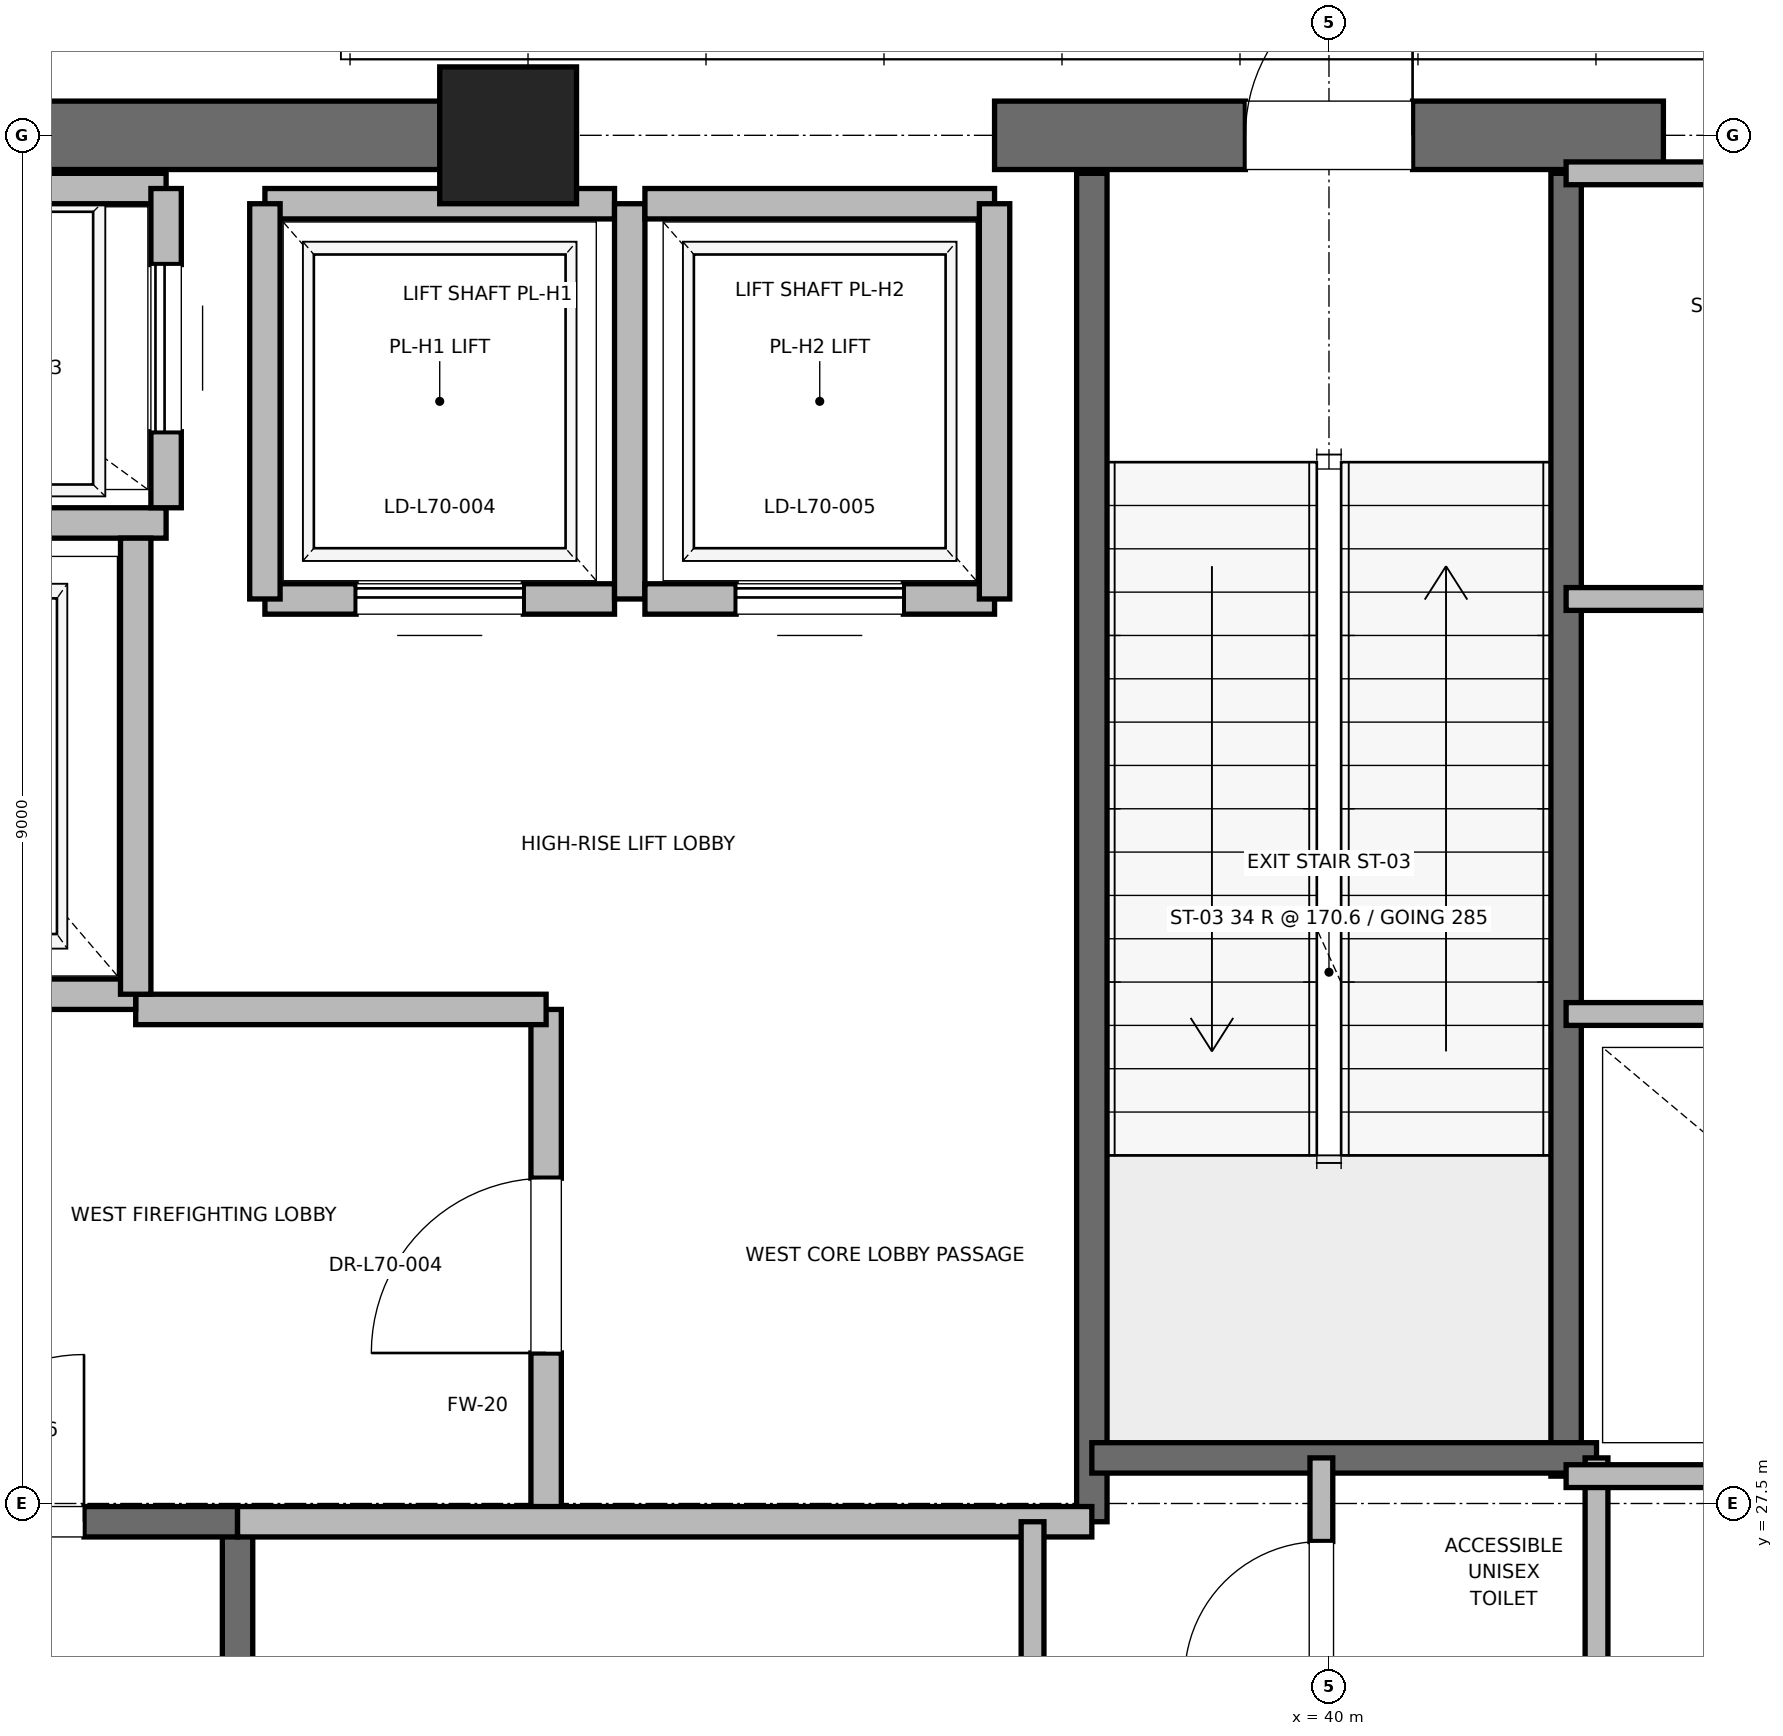
"""IFC4 building model, lengths in metres.
Left out: names, types, materials, properties, quantities, classifications, styles, units other than length and angle.
Written with IfcOpenShell. Run it as: python <this file> out.ifc"""

import sys

from ifc_helpers import new_model, si_unit, direction, frame, frame_2d, origin, origin_2d, place, context, subcontext, project, spatial, rectangle, extrude, element, fill, save


model = new_model("IFC4")
c1 = context("Model", 3, precision=1e-05, world=origin(), true_north=direction((0.0, 1.0)))
c2 = subcontext(c1, "Body", "Model", "MODEL_VIEW")
j1 = project(units=[si_unit("LENGTHUNIT", "METRE"), si_unit("PLANEANGLEUNIT", "RADIAN")], contexts=[c1])
p1 = place(None, origin())
s1 = spatial("IfcSite", under=j1, at=p1, CompositionType="ELEMENT")
p2 = place(p1, origin())
s2 = spatial("IfcBuilding", under=s1, at=p2, CompositionType="ELEMENT")
p3 = place(p2, frame((0.0, 0.0, 301.0)))
s3 = spatial("IfcBuildingStorey", under=s2, at=p3, CompositionType="ELEMENT", Elevation=301.0)
p4 = place(p3, frame((34.6, 36.5, 0.0), z_axis=(0.0, 0.0, 1.0), x_axis=(1.0, 0.0, 0.0)))
e1 = element("IfcColumn", 1, at=p4, inside=s3, PredefinedType="PILASTER", context=c2, shape_type="SweptSolid", body=[
    extrude(rectangle(XDim=0.9, YDim=0.9, at=origin_2d()), origin(), (0.0, 0.0, 1.0), 5.8),
])
p5 = place(p3, frame((29.0, 36.5, 0.0), z_axis=(0.0, 0.0, 1.0), x_axis=(1.0, 0.0, 0.0)))
e2 = element("IfcWall", 2, at=p5, inside=s3, PredefinedType="SHEAR", context=c2, shape_type="SweptSolid", body=[
    extrude(rectangle(XDim=5.8, YDim=0.45, at=frame_2d((2.9, 0.0))), origin(), (0.0, 0.0, 1.0), 5.585),
])
p6 = place(p3, frame((37.8, 36.5, 0.0), z_axis=(0.0, 0.0, 1.0), x_axis=(1.0, 0.0, 0.0)))
e3 = element("IfcWall", 3, at=p6, inside=s3, PredefinedType="SHEAR", context=c2, shape_type="SweptSolid", body=[
    extrude(rectangle(XDim=4.4, YDim=0.45, at=frame_2d((2.2, 0.0))), origin(), (0.0, 0.0, 1.0), 5.585),
])
p7 = place(p6, frame((1.65, 0.0, 0.0)))
e4 = element("IfcOpeningElement", 4, at=p7, cuts=e3, PredefinedType="OPENING", context=c2, shape_type="SweptSolid", body=[
    extrude(rectangle(XDim=1.1, YDim=2.15, at=frame_2d((0.55, 1.075))), frame((0.0, 0.225, 0.0), z_axis=(0.0, -1.0, 0.0), x_axis=(1.0, 0.0, 0.0)), (0.0, 0.0, 1.0), 0.45),
])
p8 = place(p3, frame((32.82, 18.6, 0.0), z_axis=(0.0, 0.0, 1.0), x_axis=(0.0, 1.0, 0.0)))
e5 = element("IfcWall", 5, at=p8, inside=s3, PredefinedType="SOLIDWALL", context=c2, shape_type="SweptSolid", body=[
    extrude(rectangle(XDim=8.78, YDim=0.2, at=frame_2d((4.39, 0.0))), origin(), (0.0, 0.0, 1.0), 5.585),
])
p9 = place(p3, frame((29.7, 27.38, 0.0), z_axis=(0.0, 0.0, 1.0), x_axis=(1.0, 0.0, 0.0)))
e6 = element("IfcWall", 6, at=p9, inside=s3, PredefinedType="SOLIDWALL", context=c2, shape_type="SweptSolid", body=[
    extrude(rectangle(XDim=3.12, YDim=0.2, at=frame_2d((1.56, 0.0))), origin(), (0.0, 0.0, 1.0), 5.585),
])
p10 = place(p9, frame((1.01, 0.0, 0.0)))
e7 = element("IfcOpeningElement", 7, at=p10, cuts=e6, PredefinedType="OPENING", context=c2, shape_type="SweptSolid", body=[
    extrude(rectangle(XDim=1.1, YDim=2.15, at=frame_2d((0.55, 1.075))), frame((0.0, 0.1, 0.0), z_axis=(0.0, -1.0, 0.0), x_axis=(1.0, 0.0, 0.0)), (0.0, 0.0, 1.0), 0.2),
])
p11 = place(p3, frame((38.44, 27.38, 0.0), z_axis=(0.0, 0.0, 1.0), x_axis=(0.0, 1.0, 0.0)))
e8 = element("IfcWall", 8, at=p11, inside=s3, PredefinedType="SOLIDWALL", context=c2, shape_type="SweptSolid", body=[
    extrude(rectangle(XDim=8.87, YDim=0.2, at=frame_2d((4.435, 0.0))), origin(), (0.0, 0.0, 1.0), 5.585),
])
p12 = place(p3, frame((41.56, 27.68, 0.0), z_axis=(0.0, 0.0, 1.0), x_axis=(0.0, 1.0, 0.0)))
e9 = element("IfcWall", 9, at=p12, inside=s3, PredefinedType="SOLIDWALL", context=c2, shape_type="SweptSolid", body=[
    extrude(rectangle(XDim=8.57, YDim=0.2, at=frame_2d((4.285, 0.0))), origin(), (0.0, 0.0, 1.0), 5.585),
])
p13 = place(p3, frame((38.44, 27.8, 0.0), z_axis=(0.0, 0.0, 1.0), x_axis=(1.0, 0.0, 0.0)))
e10 = element("IfcWall", 10, at=p13, inside=s3, PredefinedType="SOLIDWALL", context=c2, shape_type="SweptSolid", body=[
    extrude(rectangle(XDim=3.32, YDim=0.2, at=frame_2d((1.66, 0.0))), origin(), (0.0, 0.0, 1.0), 5.585),
])
p14 = place(p3, frame((34.85, 27.38, 0.0), z_axis=(0.0, 0.0, 1.0), x_axis=(0.0, 1.0, 0.0)))
e11 = element("IfcWall", 11, at=p14, inside=s3, PredefinedType="PARTITIONING", context=c2, shape_type="SweptSolid", body=[
    extrude(rectangle(XDim=3.37, YDim=0.2, at=frame_2d((1.685, 0.0))), origin(), (0.0, 0.0, 1.0), 5.585),
])
p15 = place(p14, frame((1.11, 0.0, 0.0)))
e12 = element("IfcOpeningElement", 12, at=p15, cuts=e11, PredefinedType="OPENING", context=c2, shape_type="SweptSolid", body=[
    extrude(rectangle(XDim=1.15, YDim=2.2, at=frame_2d((0.575, 1.1))), frame((0.0, 0.1, 0.0), z_axis=(0.0, -1.0, 0.0), x_axis=(1.0, 0.0, 0.0)), (0.0, 0.0, 1.0), 0.2),
])
p16 = place(p3, frame((32.82, 27.38, 0.0), z_axis=(0.0, 0.0, 1.0), x_axis=(1.0, 0.0, 0.0)))
e13 = element("IfcWall", 13, at=p16, inside=s3, PredefinedType="PARTITIONING", context=c2, shape_type="SweptSolid", body=[
    extrude(rectangle(XDim=5.62, YDim=0.2, at=frame_2d((2.81, 0.0))), origin(), (0.0, 0.0, 1.0), 5.585),
])
p17 = place(p3, frame((32.15, 30.75, 0.0), z_axis=(0.0, 0.0, 1.0), x_axis=(1.0, 0.0, 0.0)))
e14 = element("IfcWall", 14, at=p17, inside=s3, PredefinedType="PARTITIONING", context=c2, shape_type="SweptSolid", body=[
    extrude(rectangle(XDim=2.7, YDim=0.2, at=frame_2d((1.35, 0.0))), origin(), (0.0, 0.0, 1.0), 5.585),
])
p18 = place(p3, frame((29.55, 30.85, 0.0), z_axis=(0.0, 0.0, 1.0), x_axis=(1.0, 0.0, 0.0)))
e15 = element("IfcWall", 15, at=p18, inside=s3, PredefinedType="SOLIDWALL", context=c2, shape_type="SweptSolid", body=[
    extrude(rectangle(XDim=2.6, YDim=0.2, at=frame_2d((1.3, 0.0))), origin(), (0.0, 0.0, 1.0), 4.665),
])
p19 = place(p18, frame((0.75, 0.0, 0.0)))
e16 = element("IfcOpeningElement", 16, at=p19, cuts=e15, PredefinedType="OPENING", context=c2, shape_type="SweptSolid", body=[
    extrude(rectangle(XDim=1.1, YDim=2.2, at=frame_2d((0.55, 1.1))), frame((0.0, 0.1, 0.0), z_axis=(0.0, -1.0, 0.0), x_axis=(1.0, 0.0, 0.0)), (0.0, 0.0, 1.0), 0.2),
])
p20 = place(p3, frame((29.55, 33.95, 0.0), z_axis=(0.0, 0.0, 1.0), x_axis=(1.0, 0.0, 0.0)))
e17 = element("IfcWall", 17, at=p20, inside=s3, PredefinedType="SOLIDWALL", context=c2, shape_type="SweptSolid", body=[
    extrude(rectangle(XDim=2.8, YDim=0.2, at=frame_2d((1.4, 0.0))), origin(), (0.0, 0.0, 1.0), 5.585),
])
p21 = place(p3, frame((32.15, 30.85, 0.0), z_axis=(0.0, 0.0, 1.0), x_axis=(0.0, 1.0, 0.0)))
e18 = element("IfcWall", 18, at=p21, inside=s3, PredefinedType="SOLIDWALL", context=c2, shape_type="SweptSolid", body=[
    extrude(rectangle(XDim=3.0, YDim=0.2, at=frame_2d((1.5, 0.0))), origin(), (0.0, 0.0, 1.0), 5.585),
])
p22 = place(p3, frame((32.35, 36.15, 0.0), z_axis=(0.0, 0.0, 1.0), x_axis=(-1.0, 0.0, 0.0)))
e19 = element("IfcWall", 19, at=p22, inside=s3, PredefinedType="SOLIDWALL", context=c2, shape_type="SweptSolid", body=[
    extrude(rectangle(XDim=2.8, YDim=0.2, at=frame_2d((1.4, 0.0))), origin(), (0.0, 0.0, 1.0), 4.638),
])
p23 = place(p3, frame((32.35, 34.05, 0.0), z_axis=(0.0, 0.0, 1.0), x_axis=(0.0, 1.0, 0.0)))
e20 = element("IfcWall", 20, at=p23, inside=s3, PredefinedType="SOLIDWALL", context=c2, shape_type="SweptSolid", body=[
    extrude(rectangle(XDim=2.1, YDim=0.2, at=frame_2d((1.05, 0.0))), origin(), (0.0, 0.0, 1.0), 5.585),
])
p24 = place(p23, frame((0.5, 0.0, 0.0)))
e21 = element("IfcOpeningElement", 21, at=p24, cuts=e20, PredefinedType="OPENING", context=c2, shape_type="SweptSolid", body=[
    extrude(rectangle(XDim=1.1, YDim=2.2, at=frame_2d((0.55, 1.1))), frame((0.0, 0.1, 0.0), z_axis=(0.0, -1.0, 0.0), x_axis=(1.0, 0.0, 0.0)), (0.0, 0.0, 1.0), 0.2),
])
p25 = place(p3, frame((33.0, 33.45, 0.0), z_axis=(0.0, 0.0, 1.0), x_axis=(1.0, 0.0, 0.0)))
e22 = element("IfcWall", 22, at=p25, inside=s3, PredefinedType="SOLIDWALL", context=c2, shape_type="SweptSolid", body=[
    extrude(rectangle(XDim=2.3, YDim=0.2, at=frame_2d((1.15, 0.0))), origin(), (0.0, 0.0, 1.0), 5.585),
])
p26 = place(p25, frame((0.6, 0.0, 0.0)))
e23 = element("IfcOpeningElement", 23, at=p26, cuts=e22, PredefinedType="OPENING", context=c2, shape_type="SweptSolid", body=[
    extrude(rectangle(XDim=1.1, YDim=2.2, at=frame_2d((0.55, 1.1))), frame((0.0, 0.1, 0.0), z_axis=(0.0, -1.0, 0.0), x_axis=(1.0, 0.0, 0.0)), (0.0, 0.0, 1.0), 0.2),
])
p27 = place(p3, frame((35.3, 36.05, 0.0), z_axis=(0.0, 0.0, 1.0), x_axis=(-1.0, 0.0, 0.0)))
e24 = element("IfcWall", 24, at=p27, inside=s3, PredefinedType="SOLIDWALL", context=c2, shape_type="SweptSolid", body=[
    extrude(rectangle(XDim=2.3, YDim=0.2, at=frame_2d((1.15, 0.0))), origin(), (0.0, 0.0, 1.0), 4.665),
])
p28 = place(p3, frame((33.0, 36.05, 0.0), z_axis=(0.0, 0.0, 1.0), x_axis=(0.0, -1.0, 0.0)))
e25 = element("IfcWall", 25, at=p28, inside=s3, PredefinedType="SOLIDWALL", context=c2, shape_type="SweptSolid", body=[
    extrude(rectangle(XDim=2.6, YDim=0.2, at=frame_2d((1.3, 0.0))), origin(), (0.0, 0.0, 1.0), 5.585),
])
p29 = place(p3, frame((35.4, 33.45, 0.0), z_axis=(0.0, 0.0, 1.0), x_axis=(0.0, 1.0, 0.0)))
e26 = element("IfcWall", 26, at=p29, inside=s3, PredefinedType="SOLIDWALL", context=c2, shape_type="SweptSolid", body=[
    extrude(rectangle(XDim=2.6, YDim=0.2, at=frame_2d((1.3, 0.0))), origin(), (0.0, 0.0, 1.0), 4.665),
])
p30 = place(p3, frame((35.5, 33.45, 0.0), z_axis=(0.0, 0.0, 1.0), x_axis=(1.0, 0.0, 0.0)))
e27 = element("IfcWall", 27, at=p30, inside=s3, PredefinedType="SOLIDWALL", context=c2, shape_type="SweptSolid", body=[
    extrude(rectangle(XDim=2.3, YDim=0.2, at=frame_2d((1.15, 0.0))), origin(), (0.0, 0.0, 1.0), 5.585),
])
p31 = place(p30, frame((0.6, 0.0, 0.0)))
e28 = element("IfcOpeningElement", 28, at=p31, cuts=e27, PredefinedType="OPENING", context=c2, shape_type="SweptSolid", body=[
    extrude(rectangle(XDim=1.1, YDim=2.2, at=frame_2d((0.55, 1.1))), frame((0.0, 0.1, 0.0), z_axis=(0.0, -1.0, 0.0), x_axis=(1.0, 0.0, 0.0)), (0.0, 0.0, 1.0), 0.2),
])
p32 = place(p3, frame((37.8, 36.05, 0.0), z_axis=(0.0, 0.0, 1.0), x_axis=(-1.0, 0.0, 0.0)))
e29 = element("IfcWall", 29, at=p32, inside=s3, PredefinedType="SOLIDWALL", context=c2, shape_type="SweptSolid", body=[
    extrude(rectangle(XDim=2.3, YDim=0.2, at=frame_2d((1.15, 0.0))), origin(), (0.0, 0.0, 1.0), 4.665),
])
p33 = place(p3, frame((37.8, 33.45, 0.0), z_axis=(0.0, 0.0, 1.0), x_axis=(0.0, 1.0, 0.0)))
e30 = element("IfcWall", 30, at=p33, inside=s3, PredefinedType="SOLIDWALL", context=c2, shape_type="SweptSolid", body=[
    extrude(rectangle(XDim=2.6, YDim=0.2, at=frame_2d((1.3, 0.0))), origin(), (0.0, 0.0, 1.0), 4.665),
])
p34 = place(p3, frame((41.76, 23.8, 0.0), z_axis=(0.0, 0.0, 1.0), x_axis=(0.0, 1.0, 0.0)))
e31 = element("IfcWall", 31, at=p34, inside=s3, PredefinedType="PARTITIONING", context=c2, shape_type="SweptSolid", body=[
    extrude(rectangle(XDim=4.0, YDim=0.15, at=frame_2d((2.0, 0.0))), origin(), (0.0, 0.0, 1.0), 2.85),
])
p35 = place(p3, frame((39.95, 25.8, 0.0), z_axis=(0.0, 0.0, 1.0), x_axis=(0.0, 1.0, 0.0)))
e32 = element("IfcWall", 32, at=p35, inside=s3, PredefinedType="PARTITIONING", context=c2, shape_type="SweptSolid", body=[
    extrude(rectangle(XDim=2.0, YDim=0.15, at=frame_2d((1.0, 0.0))), origin(), (0.0, 0.0, 1.0), 2.85),
])
p36 = place(p35, frame((0.55, 0.0, 0.0)))
e33 = element("IfcOpeningElement", 33, at=p36, cuts=e32, PredefinedType="OPENING", context=c2, shape_type="SweptSolid", body=[
    extrude(rectangle(XDim=0.9, YDim=2.1, at=frame_2d((0.45, 1.05))), frame((0.0, 0.075, 0.0), z_axis=(0.0, -1.0, 0.0), x_axis=(1.0, 0.0, 0.0)), (0.0, 0.0, 1.0), 0.15),
])
p37 = place(p3, frame((38.05, 18.6, 0.0), z_axis=(0.0, 0.0, 1.0), x_axis=(0.0, 1.0, 0.0)))
e34 = element("IfcWall", 34, at=p37, inside=s3, PredefinedType="PARTITIONING", context=c2, shape_type="SweptSolid", body=[
    extrude(rectangle(XDim=8.78, YDim=0.15, at=frame_2d((4.39, 0.0))), origin(), (0.0, 0.0, 1.0), 2.85),
])
p38 = place(p37, frame((3.95, 0.0, 0.0)))
e35 = element("IfcOpeningElement", 35, at=p38, cuts=e34, PredefinedType="OPENING", context=c2, shape_type="SweptSolid", body=[
    extrude(rectangle(XDim=0.88, YDim=2.1, at=frame_2d((0.44, 1.05))), frame((0.0, 0.075, 0.0), z_axis=(0.0, -1.0, 0.0), x_axis=(1.0, 0.0, 0.0)), (0.0, 0.0, 1.0), 0.15),
])
p39 = place(p3, frame((41.56, 27.68, 0.0), z_axis=(0.0, 0.0, 1.0), x_axis=(1.0, 0.0, 0.0)))
e36 = element("IfcWall", 36, at=p39, inside=s3, PredefinedType="PARTITIONING", context=c2, shape_type="SweptSolid", body=[
    extrude(rectangle(XDim=3.59, YDim=0.15, at=frame_2d((1.795, 0.0))), origin(), (0.0, 0.0, 1.0), 2.85),
])
p40 = place(p3, frame((41.56, 30.72, 0.0), z_axis=(0.0, 0.0, 1.0), x_axis=(1.0, 0.0, 0.0)))
e37 = element("IfcWall", 37, at=p40, inside=s3, PredefinedType="PARTITIONING", context=c2, shape_type="SweptSolid", body=[
    extrude(rectangle(XDim=3.59, YDim=0.15, at=frame_2d((1.795, 0.0))), origin(), (0.0, 0.0, 1.0), 2.85),
])
p41 = place(p40, frame((1.355, 0.0, 0.0)))
e38 = element("IfcOpeningElement", 38, at=p41, cuts=e37, PredefinedType="OPENING", context=c2, shape_type="SweptSolid", body=[
    extrude(rectangle(XDim=0.88, YDim=2.1, at=frame_2d((0.44, 1.05))), frame((0.0, 0.075, 0.0), z_axis=(0.0, -1.0, 0.0), x_axis=(1.0, 0.0, 0.0)), (0.0, 0.0, 1.0), 0.15),
])
p42 = place(p3, frame((41.56, 36.25, 0.0), z_axis=(0.0, 0.0, 1.0), x_axis=(1.0, 0.0, 0.0)))
e39 = element("IfcWall", 39, at=p42, inside=s3, PredefinedType="PARTITIONING", context=c2, shape_type="SweptSolid", body=[
    extrude(rectangle(XDim=2.94, YDim=0.15, at=frame_2d((1.47, 0.0))), origin(), (0.0, 0.0, 1.0), 2.85),
])
p43 = place(p3, frame((41.56, 33.45, 0.0), z_axis=(0.0, 0.0, 1.0), x_axis=(1.0, 0.0, 0.0)))
e40 = element("IfcWall", 40, at=p43, inside=s3, PredefinedType="PARTITIONING", context=c2, shape_type="SweptSolid", body=[
    extrude(rectangle(XDim=2.94, YDim=0.15, at=frame_2d((1.47, 0.0))), origin(), (0.0, 0.0, 1.0), 2.85),
])
p44 = place(p43, frame((1.03, 0.0, 0.0)))
e41 = element("IfcOpeningElement", 41, at=p44, cuts=e40, PredefinedType="OPENING", context=c2, shape_type="SweptSolid", body=[
    extrude(rectangle(XDim=0.88, YDim=2.1, at=frame_2d((0.44, 1.05))), frame((0.0, 0.075, 0.0), z_axis=(0.0, -1.0, 0.0), x_axis=(1.0, 0.0, 0.0)), (0.0, 0.0, 1.0), 0.15),
])
p45 = place(p10, origin())
e42 = element("IfcDoor", 42, at=p45, inside=s3, OperationType="SINGLE_SWING_RIGHT", PredefinedType="DOOR", context=c2, shape_type="SweptSolid", body=[
    extrude(rectangle(XDim=1.1, YDim=2.15, at=frame_2d((0.55, 1.075))), frame((0.0, 0.025, 0.0), z_axis=(0.0, -1.0, 0.0), x_axis=(1.0, 0.0, 0.0)), (0.0, 0.0, 1.0), 0.05),
])
fill(e7, e42)
p46 = place(p7, origin())
e43 = element("IfcDoor", 43, at=p46, inside=s3, OperationType="SINGLE_SWING_RIGHT", PredefinedType="DOOR", context=c2, shape_type="SweptSolid", body=[
    extrude(rectangle(XDim=1.1, YDim=2.15, at=frame_2d((0.55, 1.075))), frame((0.0, 0.025, 0.0), z_axis=(0.0, -1.0, 0.0), x_axis=(1.0, 0.0, 0.0)), (0.0, 0.0, 1.0), 0.05),
])
fill(e4, e43)
p47 = place(p15, origin())
e44 = element("IfcDoor", 44, at=p47, inside=s3, OperationType="SINGLE_SWING_LEFT", PredefinedType="DOOR", context=c2, shape_type="SweptSolid", body=[
    extrude(rectangle(XDim=1.15, YDim=2.2, at=frame_2d((0.575, 1.1))), frame((0.0, 0.025, 0.0), z_axis=(0.0, -1.0, 0.0), x_axis=(1.0, 0.0, 0.0)), (0.0, 0.0, 1.0), 0.05),
])
fill(e12, e44)
p48 = place(p24, origin())
e45 = element("IfcDoor", 45, at=p48, inside=s3, OperationType="SLIDING_TO_RIGHT", PredefinedType="DOOR", context=c2, shape_type="SweptSolid", body=[
    extrude(rectangle(XDim=1.1, YDim=2.2, at=frame_2d((0.55, 1.1))), frame((0.0, 0.025, 0.0), z_axis=(0.0, -1.0, 0.0), x_axis=(1.0, 0.0, 0.0)), (0.0, 0.0, 1.0), 0.05),
])
fill(e21, e45)
p49 = place(p26, origin())
e46 = element("IfcDoor", 46, at=p49, inside=s3, OperationType="SLIDING_TO_RIGHT", PredefinedType="DOOR", context=c2, shape_type="SweptSolid", body=[
    extrude(rectangle(XDim=1.1, YDim=2.2, at=frame_2d((0.55, 1.1))), frame((0.0, 0.025, 0.0), z_axis=(0.0, -1.0, 0.0), x_axis=(1.0, 0.0, 0.0)), (0.0, 0.0, 1.0), 0.05),
])
fill(e23, e46)
p50 = place(p31, origin())
e47 = element("IfcDoor", 47, at=p50, inside=s3, OperationType="SLIDING_TO_RIGHT", PredefinedType="DOOR", context=c2, shape_type="SweptSolid", body=[
    extrude(rectangle(XDim=1.1, YDim=2.2, at=frame_2d((0.55, 1.1))), frame((0.0, 0.025, 0.0), z_axis=(0.0, -1.0, 0.0), x_axis=(1.0, 0.0, 0.0)), (0.0, 0.0, 1.0), 0.05),
])
fill(e28, e47)
p51 = place(p36, origin())
e48 = element("IfcDoor", 48, at=p51, inside=s3, OperationType="SINGLE_SWING_LEFT", PredefinedType="DOOR", context=c2, shape_type="SweptSolid", body=[
    extrude(rectangle(XDim=0.9, YDim=2.1, at=frame_2d((0.45, 1.05))), frame((0.0, 0.025, 0.0), z_axis=(0.0, -1.0, 0.0), x_axis=(1.0, 0.0, 0.0)), (0.0, 0.0, 1.0), 0.05),
])
fill(e33, e48)
save(model, sys.argv[1])
